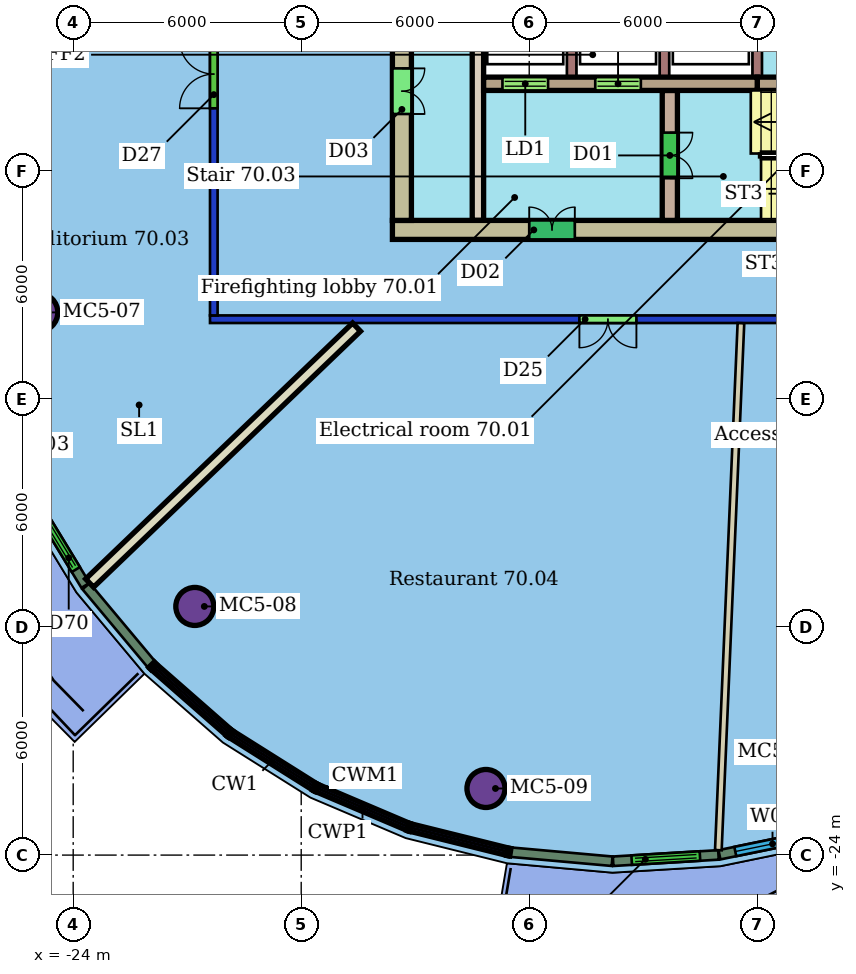
"""IFC4 building model, lengths in metres.
Left out: names, types, materials, properties, quantities, classifications, styles, units other than length and angle.
Written with IfcOpenShell. Run it as: python <this file> out.ifc"""

import sys

from ifc_helpers import new_model, si_unit, direction, frame, frame_2d, origin, origin_2d, place, context, subcontext, project, spatial, rectangle, hollow_circle, extrude, element, fill, save


model = new_model("IFC4")
c1 = context("Model", 3, precision=1e-05, world=origin(), true_north=direction((0.0, 1.0)))
c2 = subcontext(c1, "Body", "Model", "MODEL_VIEW")
j1 = project(units=[si_unit("LENGTHUNIT", "METRE"), si_unit("PLANEANGLEUNIT", "RADIAN")], contexts=[c1])
p1 = place(None, origin())
s1 = spatial("IfcSite", under=j1, at=p1, CompositionType="ELEMENT")
p2 = place(p1, origin())
s2 = spatial("IfcBuilding", under=s1, at=p2, CompositionType="ELEMENT")
p3 = place(p2, frame((0.0, 0.0, 282.9)))
s3 = spatial("IfcBuildingStorey", under=s2, at=p3, CompositionType="ELEMENT", Elevation=282.9)
for number, where, z_axis, x_axis in (
    (1, (-24.906, -9.72, 0.0), (0.0, 0.0, 1.0), (1.0, 0.0, 0.0)),
    (2, (-20.8, -17.457, 0.0), (0.0, 0.0, 1.0), (1.0, 0.0, 0.0)),
    (3, (-13.138, -22.247, 0.0), (0.0, 0.0, 1.0), (1.0, 0.0, 0.0)),
):
    element("IfcColumn", number, at=place(p3, frame(where, z_axis=z_axis, x_axis=x_axis)), inside=s3, PredefinedType="COLUMN", context=c2, shape_type="SweptSolid", body=[
        extrude(hollow_circle(Radius=0.5, WallThickness=0.04, at=origin_2d()), origin(), (0.0, 0.0, 1.0), 3.45),
    ])
p4 = place(p3, frame((8.4, -9.9, 0.0), z_axis=(0.0, 0.0, 1.0), x_axis=(-1.0, 0.0, 0.0)))
e4 = element("IfcWall", 4, at=p4, inside=s3, PredefinedType="PARTITIONING", context=c2, shape_type="SweptSolid", body=[
    extrude(rectangle(XDim=28.8, YDim=0.2, at=frame_2d((14.4, 0.0))), origin(), (0.0, 0.0, 1.0), 3.1),
])
p5 = place(p4, frame((17.579, 0.0, 0.0)))
e5 = element("IfcOpeningElement", 5, at=p5, cuts=e4, PredefinedType="OPENING", context=c2, shape_type="SweptSolid", body=[
    extrude(rectangle(XDim=1.5, YDim=2.4, at=frame_2d((0.75, 1.2))), frame((0.0, 0.11, 0.0), z_axis=(0.0, -1.0, 0.0), x_axis=(1.0, 0.0, 0.0)), (0.0, 0.0, 1.0), 0.22),
])
p6 = place(p4, frame((9.185, 0.0, 0.0)))
e6 = element("IfcOpeningElement", 6, at=p6, cuts=e4, PredefinedType="OPENING", context=c2, shape_type="SweptSolid", body=[
    extrude(rectangle(XDim=1.8, YDim=2.4, at=frame_2d((0.9, 1.2))), frame((0.0, 0.11, 0.0), z_axis=(0.0, -1.0, 0.0), x_axis=(1.0, 0.0, 0.0)), (0.0, 0.0, 1.0), 0.22),
])
p7 = place(p3, frame((-20.3, -9.8, 0.0), z_axis=(0.0, 0.0, 1.0), x_axis=(0.0, 1.0, 0.0)))
e7 = element("IfcWall", 7, at=p7, inside=s3, PredefinedType="PARTITIONING", context=c2, shape_type="SweptSolid", body=[
    extrude(rectangle(XDim=19.6, YDim=0.2, at=frame_2d((9.8, 0.0))), origin(), (0.0, 0.0, 1.0), 3.1),
])
p8 = place(p7, frame((5.449, 0.0, 0.0)))
e8 = element("IfcOpeningElement", 8, at=p8, cuts=e7, PredefinedType="OPENING", context=c2, shape_type="SweptSolid", body=[
    extrude(rectangle(XDim=1.8, YDim=2.4, at=frame_2d((0.9, 1.2))), frame((0.0, 0.11, 0.0), z_axis=(0.0, -1.0, 0.0), x_axis=(1.0, 0.0, 0.0)), (0.0, 0.0, 1.0), 0.22),
])
p9 = place(p3, frame((-23.568, -16.842, 0.0), z_axis=(0.0, 0.0, 1.0), x_axis=(0.721865986277, 0.692032873393, 0.0)))
e9 = element("IfcWall", 9, at=p9, inside=s3, PredefinedType="PARTITIONING", context=c2, shape_type="SweptSolid", body=[
    extrude(rectangle(XDim=9.73, YDim=0.3, at=frame_2d((4.865, 0.0))), origin(), (0.0, 0.0, 1.0), 3.45),
])
p10 = place(p3, frame((-7.023, -23.871, 0.0), z_axis=(0.0, 0.0, 1.0), x_axis=(0.042831131953, 0.999082326005, 0.0)))
e10 = element("IfcWall", 10, at=p10, inside=s3, PredefinedType="PARTITIONING", context=c2, shape_type="SweptSolid", body=[
    extrude(rectangle(XDim=13.88, YDim=0.175, at=frame_2d((6.94, 0.0))), origin(), (0.0, 0.0, 1.0), 3.45),
])
p11 = place(p3, frame((-25.122, -14.532, 0.0), z_axis=(0.0, 0.0, 1.0), x_axis=(0.520443293114, -0.853896234125, 0.0)))
e11 = element("IfcWall", 11, at=p11, inside=s3, PredefinedType="SOLIDWALL", context=c2, shape_type="SweptSolid", body=[
    extrude(rectangle(XDim=2.777, YDim=0.25, at=frame_2d((1.389, 0.0))), origin(), (0.0, 0.0, 1.0), 3.15),
])
p12 = place(p11, frame((0.489, 0.0, 0.0)))
e12 = element("IfcOpeningElement", 12, at=p12, cuts=e11, PredefinedType="OPENING", context=c2, shape_type="SweptSolid", body=[
    extrude(rectangle(XDim=1.8, YDim=2.4, at=frame_2d((0.9, 1.2))), frame((0.0, 0.135, 0.0), z_axis=(0.0, -1.0, 0.0), x_axis=(1.0, 0.0, 0.0)), (0.0, 0.0, 1.0), 0.27),
])
for number, where, z_axis, x_axis in (
    (13, (-23.661, -16.925, 0.0), (0.0, 0.0, 1.0), (0.641, -0.767, 0.0)),
    (14, (-12.482, -23.924, 0.0), (0.0, 0.0, 1.0), (0.996, -0.089, 0.0)),
):
    element("IfcWall", number, at=place(p3, frame(where, z_axis=z_axis, x_axis=x_axis)), inside=s3, PredefinedType="SOLIDWALL", context=c2, shape_type="SweptSolid", body=[
        extrude(rectangle(XDim=2.674, YDim=0.25, at=frame_2d((1.337, 0.0))), origin(), (0.0, 0.0, 1.0), 3.15),
    ])
p13 = place(p3, frame((-9.792, -24.162, 0.0), z_axis=(0.0, 0.0, 1.0), x_axis=(0.998195899902, 0.060041197678, 0.0)))
e15 = element("IfcWall", 15, at=p13, inside=s3, PredefinedType="SOLIDWALL", context=c2, shape_type="SweptSolid", body=[
    extrude(rectangle(XDim=2.777, YDim=0.25, at=frame_2d((1.389, 0.0))), origin(), (0.0, 0.0, 1.0), 3.15),
])
p14 = place(p13, frame((0.489, 0.0, 0.0)))
e16 = element("IfcOpeningElement", 16, at=p14, cuts=e15, PredefinedType="OPENING", context=c2, shape_type="SweptSolid", body=[
    extrude(rectangle(XDim=1.8, YDim=2.4, at=frame_2d((0.9, 1.2))), frame((0.0, 0.135, 0.0), z_axis=(0.0, -1.0, 0.0), x_axis=(1.0, 0.0, 0.0)), (0.0, 0.0, 1.0), 0.27),
])
p15 = place(p3, frame((-6.994, -23.992, 0.0), z_axis=(0.0, 0.0, 1.0), x_axis=(0.979580220635, 0.201053702627, 0.0)))
e17 = element("IfcWall", 17, at=p15, inside=s3, PredefinedType="SOLIDWALL", context=c2, shape_type="SweptSolid", body=[
    extrude(rectangle(XDim=2.851, YDim=0.25, at=frame_2d((1.426, 0.0))), origin(), (0.0, 0.0, 1.0), 3.15),
])
p16 = place(p15, frame((0.426, 0.0, 0.9)))
e18 = element("IfcOpeningElement", 18, at=p16, cuts=e17, PredefinedType="OPENING", context=c2, shape_type="SweptSolid", body=[
    extrude(rectangle(XDim=2.0, YDim=2.1, at=frame_2d((1.0, 1.05))), frame((0.0, 0.135, 0.0), z_axis=(0.0, -1.0, 0.0), x_axis=(1.0, 0.0, 0.0)), (0.0, 0.0, 1.0), 0.27),
])
p17 = place(p3, frame((-15.6, -7.55, 0.0), z_axis=(0.0, 0.0, 1.0), x_axis=(1.0, 0.0, 0.0)))
e19 = element("IfcWall", 19, at=p17, inside=s3, PredefinedType="SHEAR", context=c2, shape_type="SweptSolid", body=[
    extrude(rectangle(XDim=19.2, YDim=0.5, at=frame_2d((9.6, 0.0))), origin(), (0.0, 0.0, 1.0), 3.3),
])
p18 = place(p17, frame((3.6, 0.0, 0.0)))
e20 = element("IfcOpeningElement", 20, at=p18, cuts=e19, PredefinedType="OPENING", context=c2, shape_type="SweptSolid", body=[
    extrude(rectangle(XDim=1.2, YDim=2.1, at=frame_2d((0.6, 1.05))), frame((0.0, 0.26, 0.0), z_axis=(0.0, -1.0, 0.0), x_axis=(1.0, 0.0, 0.0)), (0.0, 0.0, 1.0), 0.52),
])
p19 = place(p3, frame((-15.35, 7.3, 0.0), z_axis=(0.0, 0.0, 1.0), x_axis=(0.0, -1.0, 0.0)))
e21 = element("IfcWall", 21, at=p19, inside=s3, PredefinedType="SHEAR", context=c2, shape_type="SweptSolid", body=[
    extrude(rectangle(XDim=14.6, YDim=0.5, at=frame_2d((7.3, 0.0))), origin(), (0.0, 0.0, 1.0), 3.3),
])
p20 = place(p19, frame((10.6, 0.0, 0.0)))
e22 = element("IfcOpeningElement", 22, at=p20, cuts=e21, PredefinedType="OPENING", context=c2, shape_type="SweptSolid", body=[
    extrude(rectangle(XDim=1.2, YDim=2.1, at=frame_2d((0.6, 1.05))), frame((0.0, 0.26, 0.0), z_axis=(0.0, -1.0, 0.0), x_axis=(1.0, 0.0, 0.0)), (0.0, 0.0, 1.0), 0.52),
])
p21 = place(p19, frame((2.8, 0.0, 0.0)))
e23 = element("IfcOpeningElement", 23, at=p21, cuts=e21, PredefinedType="OPENING", context=c2, shape_type="SweptSolid", body=[
    extrude(rectangle(XDim=1.2, YDim=2.1, at=frame_2d((0.6, 1.05))), frame((0.0, 0.26, 0.0), z_axis=(0.0, -1.0, 0.0), x_axis=(1.0, 0.0, 0.0)), (0.0, 0.0, 1.0), 0.52),
])
p22 = place(p3, frame((-13.2, -3.705, 0.0), z_axis=(0.0, 0.0, 1.0), x_axis=(1.0, 0.0, 0.0)))
e24 = element("IfcWall", 24, at=p22, inside=s3, PredefinedType="SHEAR", context=c2, shape_type="SweptSolid", body=[
    extrude(rectangle(XDim=7.2, YDim=0.35, at=frame_2d((3.6, 0.0))), origin(), (0.0, 0.0, 1.0), 3.3),
])
p23 = place(p22, frame((0.496, 0.0, 0.0)))
e25 = element("IfcOpeningElement", 25, at=p23, cuts=e24, PredefinedType="OPENING", context=c2, shape_type="SweptSolid", body=[
    extrude(rectangle(XDim=1.2, YDim=2.1, at=frame_2d((0.6, 1.05))), frame((0.0, 0.185, 0.0), z_axis=(0.0, -1.0, 0.0), x_axis=(1.0, 0.0, 0.0)), (0.0, 0.0, 1.0), 0.37),
])
p24 = place(p22, frame((2.938, 0.0, 0.0)))
e26 = element("IfcOpeningElement", 26, at=p24, cuts=e24, PredefinedType="OPENING", context=c2, shape_type="SweptSolid", body=[
    extrude(rectangle(XDim=1.2, YDim=2.1, at=frame_2d((0.6, 1.05))), frame((0.0, 0.185, 0.0), z_axis=(0.0, -1.0, 0.0), x_axis=(1.0, 0.0, 0.0)), (0.0, 0.0, 1.0), 0.37),
])
p25 = place(p3, frame((-6.0, -3.705, 0.0), z_axis=(0.0, 0.0, 1.0), x_axis=(1.0, 0.0, 0.0)))
e27 = element("IfcWall", 27, at=p25, inside=s3, PredefinedType="SHEAR", context=c2, shape_type="SweptSolid", body=[
    extrude(rectangle(XDim=7.2, YDim=0.35, at=frame_2d((3.6, 0.0))), origin(), (0.0, 0.0, 1.0), 3.3),
])
p26 = place(p3, frame((-13.35, 7.3, 0.0), z_axis=(0.0, 0.0, 1.0), x_axis=(0.0, -1.0, 0.0)))
e28 = element("IfcWall", 28, at=p26, inside=s3, PredefinedType="SHEAR", context=c2, shape_type="SweptSolid", body=[
    extrude(rectangle(XDim=14.6, YDim=0.3, at=frame_2d((7.3, 0.0))), origin(), (0.0, 0.0, 1.0), 3.3),
])
p27 = place(p26, frame((6.55, 0.0, 0.0)))
e29 = element("IfcOpeningElement", 29, at=p27, cuts=e28, PredefinedType="OPENING", context=c2, shape_type="SweptSolid", body=[
    extrude(rectangle(XDim=1.5, YDim=2.1, at=frame_2d((0.75, 1.05))), frame((0.0, 0.16, 0.0), z_axis=(0.0, -1.0, 0.0), x_axis=(1.0, 0.0, 0.0)), (0.0, 0.0, 1.0), 0.32),
])
p28 = place(p3, frame((-8.3, -3.88, 0.0), z_axis=(0.0, 0.0, 1.0), x_axis=(0.0, -1.0, 0.0)))
e30 = element("IfcWall", 30, at=p28, inside=s3, PredefinedType="SHEAR", context=c2, shape_type="SweptSolid", body=[
    extrude(rectangle(XDim=3.42, YDim=0.4, at=frame_2d((1.71, 0.0))), origin(), (0.0, 0.0, 1.0), 3.3),
])
p29 = place(p28, frame((1.11, 0.0, 0.0)))
e31 = element("IfcOpeningElement", 31, at=p29, cuts=e30, PredefinedType="OPENING", context=c2, shape_type="SweptSolid", body=[
    extrude(rectangle(XDim=1.2, YDim=2.1, at=frame_2d((0.6, 1.05))), frame((0.0, 0.21, 0.0), z_axis=(0.0, -1.0, 0.0), x_axis=(1.0, 0.0, 0.0)), (0.0, 0.0, 1.0), 0.42),
])
for number, where, z_axis, x_axis in (
    (32, (-10.883, -1.6, 0.0), (0.0, 0.0, 1.0), (0.0, -1.0, 0.0)),
    (33, (-8.442, -1.6, 0.0), (0.0, 0.0, 1.0), (0.0, -1.0, 0.0)),
    (34, (-6.0, -1.6, 0.0), (0.0, 0.0, 1.0), (0.0, -1.0, 0.0)),
):
    element("IfcWall", number, at=place(p3, frame(where, z_axis=z_axis, x_axis=x_axis)), inside=s3, PredefinedType="SHEAR", context=c2, shape_type="SweptSolid", body=[
        extrude(rectangle(XDim=1.93, YDim=0.25, at=frame_2d((0.965, 0.0))), origin(), (0.0, 0.0, 1.0), 3.3),
    ])
p30 = place(p8, origin())
e35 = element("IfcDoor", 35, at=p30, inside=s3, OperationType="DOUBLE_DOOR_SINGLE_SWING", PredefinedType="DOOR", context=c2, shape_type="SweptSolid", body=[
    extrude(rectangle(XDim=1.8, YDim=2.4, at=frame_2d((0.9, 1.2))), frame((0.0, 0.025, 0.0), z_axis=(0.0, -1.0, 0.0), x_axis=(1.0, 0.0, 0.0)), (0.0, 0.0, 1.0), 0.05),
])
fill(e8, e35)
p31 = place(p5, origin())
e36 = element("IfcDoor", 36, at=p31, inside=s3, OperationType="DOUBLE_DOOR_SINGLE_SWING", PredefinedType="DOOR", context=c2, shape_type="SweptSolid", body=[
    extrude(rectangle(XDim=1.5, YDim=2.4, at=frame_2d((0.75, 1.2))), frame((0.0, 0.025, 0.0), z_axis=(0.0, -1.0, 0.0), x_axis=(1.0, 0.0, 0.0)), (0.0, 0.0, 1.0), 0.05),
])
fill(e5, e36)
p32 = place(p12, origin())
e37 = element("IfcDoor", 37, at=p32, inside=s3, OperationType="DOUBLE_DOOR_SLIDING", PredefinedType="DOOR", context=c2, shape_type="SweptSolid", body=[
    extrude(rectangle(XDim=1.8, YDim=2.4, at=frame_2d((0.9, 1.2))), frame((0.0, 0.025, 0.0), z_axis=(0.0, -1.0, 0.0), x_axis=(1.0, 0.0, 0.0)), (0.0, 0.0, 1.0), 0.05),
])
fill(e12, e37)
p33 = place(p14, origin())
e38 = element("IfcDoor", 38, at=p33, inside=s3, OperationType="DOUBLE_DOOR_SLIDING", PredefinedType="DOOR", context=c2, shape_type="SweptSolid", body=[
    extrude(rectangle(XDim=1.8, YDim=2.4, at=frame_2d((0.9, 1.2))), frame((0.0, 0.025, 0.0), z_axis=(0.0, -1.0, 0.0), x_axis=(1.0, 0.0, 0.0)), (0.0, 0.0, 1.0), 0.05),
])
fill(e16, e38)
p34 = place(p16, origin())
e39 = element("IfcWindow", 39, at=p34, inside=s3, PartitioningType="SINGLE_PANEL", PredefinedType="WINDOW", context=c2, shape_type="SweptSolid", body=[
    extrude(rectangle(XDim=2.0, YDim=2.1, at=frame_2d((1.0, 1.05))), frame((0.0, 0.03, 0.0), z_axis=(0.0, -1.0, 0.0), x_axis=(1.0, 0.0, 0.0)), (0.0, 0.0, 1.0), 0.06),
])
fill(e18, e39)
p35 = place(p18, origin())
e40 = element("IfcDoor", 40, at=p35, inside=s3, OperationType="DOUBLE_DOOR_SINGLE_SWING", PredefinedType="NOTDEFINED", context=c2, shape_type="SweptSolid", body=[
    extrude(rectangle(XDim=1.2, YDim=2.1, at=frame_2d((0.6, 1.05))), frame((0.0, 0.025, 0.0), z_axis=(0.0, -1.0, 0.0), x_axis=(1.0, 0.0, 0.0)), (0.0, 0.0, 1.0), 0.05),
])
fill(e20, e40)
p36 = place(p20, origin())
e41 = element("IfcDoor", 41, at=p36, inside=s3, OperationType="DOUBLE_DOOR_SINGLE_SWING", PredefinedType="NOTDEFINED", context=c2, shape_type="SweptSolid", body=[
    extrude(rectangle(XDim=1.2, YDim=2.1, at=frame_2d((0.6, 1.05))), frame((0.0, 0.025, 0.0), z_axis=(0.0, -1.0, 0.0), x_axis=(1.0, 0.0, 0.0)), (0.0, 0.0, 1.0), 0.05),
])
fill(e22, e41)
p37 = place(p23, origin())
e42 = element("IfcDoor", 42, at=p37, inside=s3, OperationType="DOUBLE_DOOR_SLIDING", PredefinedType="NOTDEFINED", context=c2, shape_type="SweptSolid", body=[
    extrude(rectangle(XDim=1.2, YDim=2.1, at=frame_2d((0.6, 1.05))), frame((0.0, 0.025, 0.0), z_axis=(0.0, -1.0, 0.0), x_axis=(1.0, 0.0, 0.0)), (0.0, 0.0, 1.0), 0.05),
])
fill(e25, e42)
p38 = place(p24, origin())
e43 = element("IfcDoor", 43, at=p38, inside=s3, OperationType="DOUBLE_DOOR_SLIDING", PredefinedType="NOTDEFINED", context=c2, shape_type="SweptSolid", body=[
    extrude(rectangle(XDim=1.2, YDim=2.1, at=frame_2d((0.6, 1.05))), frame((0.0, 0.025, 0.0), z_axis=(0.0, -1.0, 0.0), x_axis=(1.0, 0.0, 0.0)), (0.0, 0.0, 1.0), 0.05),
])
fill(e26, e43)
p39 = place(p29, origin())
e44 = element("IfcDoor", 44, at=p39, inside=s3, OperationType="DOUBLE_DOOR_SINGLE_SWING", PredefinedType="NOTDEFINED", context=c2, shape_type="SweptSolid", body=[
    extrude(rectangle(XDim=1.2, YDim=2.1, at=frame_2d((0.6, 1.05))), frame((0.0, 0.025, 0.0), z_axis=(0.0, -1.0, 0.0), x_axis=(1.0, 0.0, 0.0)), (0.0, 0.0, 1.0), 0.05),
])
fill(e31, e44)
save(model, sys.argv[1])
